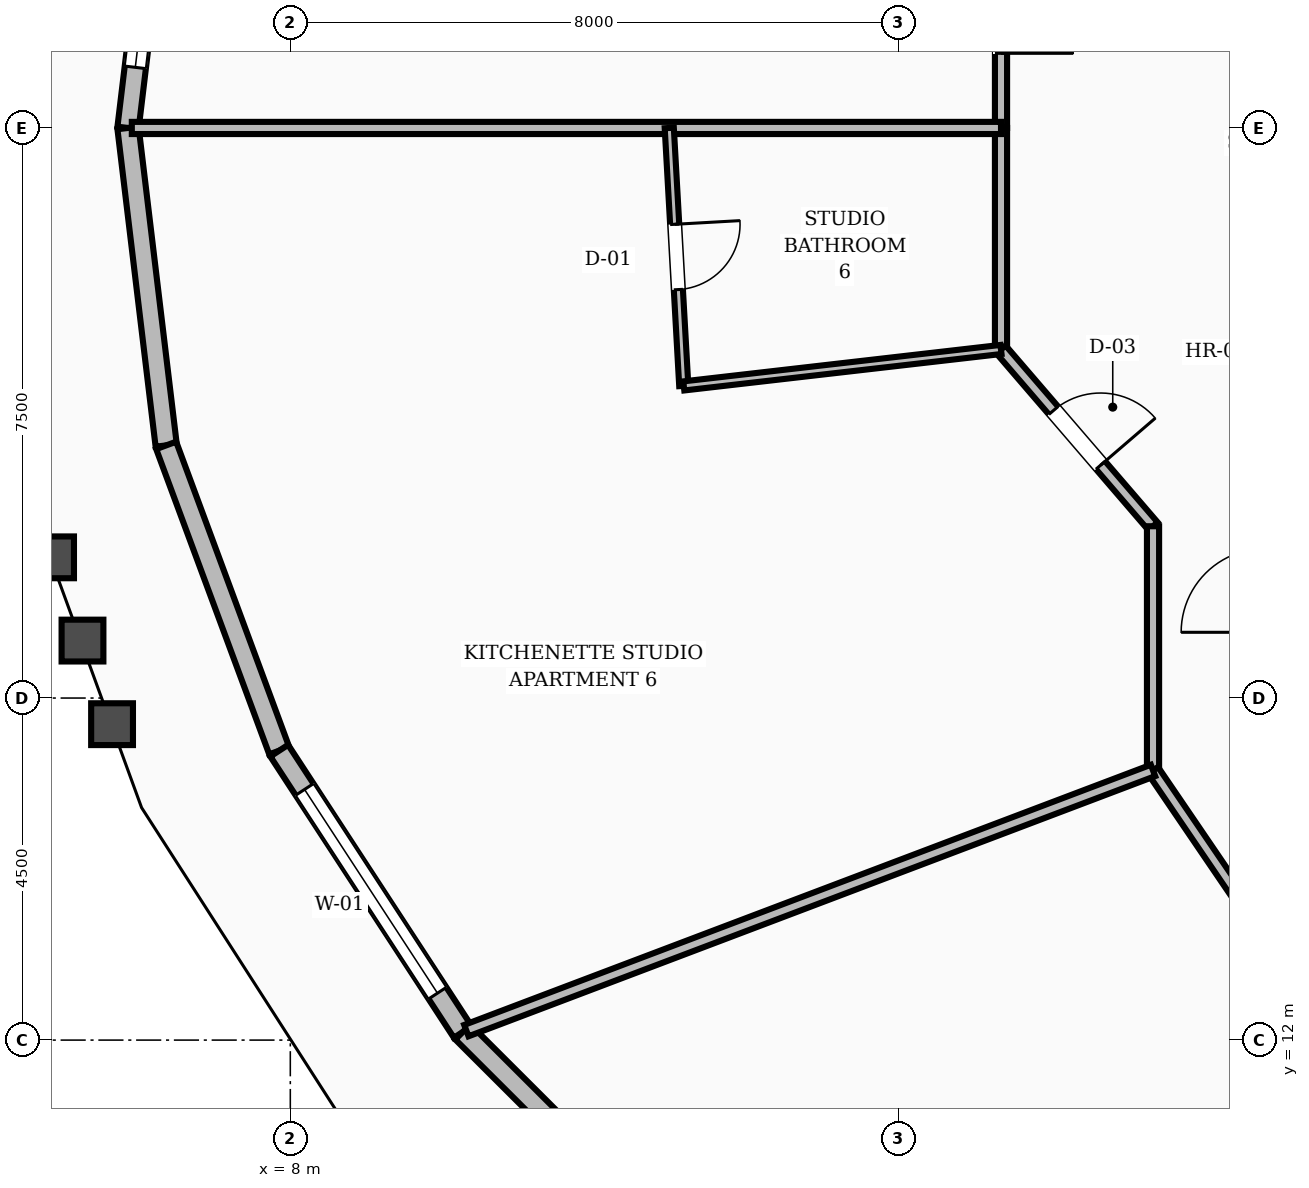
"""IFC4 building model, lengths in metres.
Left out: names, types, materials, properties, quantities, classifications, styles, units other than length and angle.
Written with IfcOpenShell. Run it as: python <this file> out.ifc"""

import sys

from ifc_helpers import new_model, si_unit, direction, frame, frame_2d, origin, place, context, subcontext, project, spatial, rectangle, extrude, element, fill, save


model = new_model("IFC4")
c1 = context("Model", 3, precision=1e-05, world=origin(), true_north=direction((0.0, 1.0)))
c2 = subcontext(c1, "Body", "Model", "MODEL_VIEW")
j1 = project(units=[si_unit("LENGTHUNIT", "METRE"), si_unit("PLANEANGLEUNIT", "RADIAN")], contexts=[c1])
p1 = place(None, origin())
s1 = spatial("IfcSite", under=j1, at=p1, CompositionType="ELEMENT")
p2 = place(p1, origin())
s2 = spatial("IfcBuilding", under=s1, at=p2, CompositionType="ELEMENT")
p3 = place(p2, frame((0.0, 0.0, 167.6)))
s3 = spatial("IfcBuildingStorey", under=s2, at=p3, CompositionType="ELEMENT", Elevation=167.6)
p4 = place(p3, frame((6.367, 28.176, 0.0), z_axis=(0.0, 0.0, 1.0), x_axis=(-0.119390105597, -0.992847421654, 0.0)))
e1 = element("IfcWall", 1, at=p4, inside=s3, PredefinedType="STANDARD", context=c2, shape_type="SweptSolid", body=[
    extrude(rectangle(XDim=4.206, YDim=0.28, at=frame_2d((2.103, 0.0))), origin(), (0.0, 0.0, 1.0), 2.82),
])
p5 = place(p4, frame((0.803, 0.0, 0.8)))
e2 = element("IfcOpeningElement", 2, at=p5, cuts=e1, PredefinedType="OPENING", context=c2, shape_type="SweptSolid", body=[
    extrude(rectangle(XDim=2.6, YDim=1.65, at=frame_2d((1.3, 0.825))), frame((0.0, 0.15, 0.0), z_axis=(0.0, -1.0, 0.0), x_axis=(1.0, 0.0, 0.0)), (0.0, 0.0, 1.0), 0.3),
])
p6 = place(p3, frame((5.865, 24.0, 0.0), z_axis=(0.0, 0.0, 1.0), x_axis=(0.119390105597, -0.992847421654, 0.0)))
e3 = element("IfcWall", 3, at=p6, inside=s3, PredefinedType="STANDARD", context=c2, shape_type="SweptSolid", body=[
    extrude(rectangle(XDim=4.206, YDim=0.28, at=frame_2d((2.103, 0.0))), origin(), (0.0, 0.0, 1.0), 2.82),
])
p7 = place(p3, frame((6.367, 19.824, 0.0), z_axis=(0.0, 0.0, 1.0), x_axis=(0.34732178329, -0.937746009777, 0.0)))
e4 = element("IfcWall", 4, at=p7, inside=s3, PredefinedType="STANDARD", context=c2, shape_type="SweptSolid", body=[
    extrude(rectangle(XDim=4.282, YDim=0.28, at=frame_2d((2.141, 0.0))), origin(), (0.0, 0.0, 1.0), 2.82),
])
p8 = place(p3, frame((7.854, 15.808, 0.0), z_axis=(0.0, 0.0, 1.0), x_axis=(0.546488523779, -0.837466592395, 0.0)))
e5 = element("IfcWall", 5, at=p8, inside=s3, PredefinedType="STANDARD", context=c2, shape_type="SweptSolid", body=[
    extrude(rectangle(XDim=4.419, YDim=0.28, at=frame_2d((2.209, 0.0))), origin(), (0.0, 0.0, 1.0), 2.82),
])
p9 = place(p8, frame((0.61, 0.0, 0.8)))
e6 = element("IfcOpeningElement", 6, at=p9, cuts=e5, PredefinedType="OPENING", context=c2, shape_type="SweptSolid", body=[
    extrude(rectangle(XDim=3.2, YDim=1.65, at=frame_2d((1.6, 0.825))), frame((0.0, 0.15, 0.0), z_axis=(0.0, -1.0, 0.0), x_axis=(1.0, 0.0, 0.0)), (0.0, 0.0, 1.0), 0.3),
])
p10 = place(p3, frame((10.269, 12.107, 0.0), z_axis=(0.0, 0.0, 1.0), x_axis=(0.707797600077, -0.706415286729, 0.0)))
e7 = element("IfcWall", 7, at=p10, inside=s3, PredefinedType="STANDARD", context=c2, shape_type="SweptSolid", body=[
    extrude(rectangle(XDim=4.592, YDim=0.28, at=frame_2d((2.296, 0.0))), origin(), (0.0, 0.0, 1.0), 2.82),
])
p11 = place(p3, frame((17.35, 26.914, 0.0), z_axis=(0.0, 0.0, 1.0), x_axis=(0.0, -1.0, 0.0)))
e8 = element("IfcWall", 8, at=p11, inside=s3, PredefinedType="SOLIDWALL", context=c2, shape_type="SweptSolid", body=[
    extrude(rectangle(XDim=2.914, YDim=0.16, at=frame_2d((1.457, 0.0))), origin(), (0.0, 0.0, 1.0), 2.8),
])
p12 = place(p11, frame((0.982, 0.0, 0.0)))
e9 = element("IfcOpeningElement", 9, at=p12, cuts=e8, PredefinedType="OPENING", context=c2, shape_type="SweptSolid", body=[
    extrude(rectangle(XDim=0.95, YDim=2.1, at=frame_2d((0.475, 1.05))), frame((0.0, 0.09, 0.0), z_axis=(0.0, -1.0, 0.0), x_axis=(1.0, 0.0, 0.0)), (0.0, 0.0, 1.0), 0.18),
])
p13 = place(p3, frame((17.35, 24.0, 0.0), z_axis=(0.0, 0.0, 1.0), x_axis=(0.0, -1.0, 0.0)))
e10 = element("IfcWall", 10, at=p13, inside=s3, PredefinedType="SOLIDWALL", context=c2, shape_type="SweptSolid", body=[
    extrude(rectangle(XDim=2.914, YDim=0.16, at=frame_2d((1.457, 0.0))), origin(), (0.0, 0.0, 1.0), 2.8),
])
p14 = place(p3, frame((17.35, 21.086, 0.0), z_axis=(0.0, 0.0, 1.0), x_axis=(0.652022797448, -0.758199361388, 0.0)))
e11 = element("IfcWall", 11, at=p14, inside=s3, PredefinedType="SOLIDWALL", context=c2, shape_type="SweptSolid", body=[
    extrude(rectangle(XDim=3.067, YDim=0.16, at=frame_2d((1.534, 0.0))), origin(), (0.0, 0.0, 1.0), 2.8),
])
p15 = place(p14, frame((1.059, 0.0, 0.0)))
e12 = element("IfcOpeningElement", 12, at=p15, cuts=e11, PredefinedType="OPENING", context=c2, shape_type="SweptSolid", body=[
    extrude(rectangle(XDim=0.95, YDim=2.1, at=frame_2d((0.475, 1.05))), frame((0.0, 0.09, 0.0), z_axis=(0.0, -1.0, 0.0), x_axis=(1.0, 0.0, 0.0)), (0.0, 0.0, 1.0), 0.18),
])
p16 = place(p3, frame((19.35, 18.76, 0.0), z_axis=(0.0, 0.0, 1.0), x_axis=(0.0, -1.0, 0.0)))
e13 = element("IfcWall", 13, at=p16, inside=s3, PredefinedType="SOLIDWALL", context=c2, shape_type="SweptSolid", body=[
    extrude(rectangle(XDim=3.213, YDim=0.16, at=frame_2d((1.606, 0.0))), origin(), (0.0, 0.0, 1.0), 2.8),
])
p17 = place(p3, frame((19.35, 15.548, 0.0), z_axis=(0.0, 0.0, 1.0), x_axis=(0.562674669208, -0.826678423955, 0.0)))
e14 = element("IfcWall", 14, at=p17, inside=s3, PredefinedType="SOLIDWALL", context=c2, shape_type="SweptSolid", body=[
    extrude(rectangle(XDim=3.021, YDim=0.16, at=frame_2d((1.511, 0.0))), origin(), (0.0, 0.0, 1.0), 2.8),
])
p18 = place(p3, frame((17.35, 24.0, 0.0), z_axis=(0.0, 0.0, 1.0), x_axis=(-1.0, 0.0, 0.0)))
e15 = element("IfcWall", 15, at=p18, inside=s3, PredefinedType="SOLIDWALL", context=c2, shape_type="SweptSolid", body=[
    extrude(rectangle(XDim=11.435, YDim=0.16, at=frame_2d((5.718, 0.0))), origin(), (0.0, 0.0, 1.0), 2.8),
])
p19 = place(p3, frame((12.986, 24.0, 0.0), z_axis=(0.0, 0.0, 1.0), x_axis=(0.056166143668, -0.998421436221, 0.0)))
e16 = element("IfcWall", 16, at=p19, inside=s3, PredefinedType="PARTITIONING", context=c2, shape_type="SweptSolid", body=[
    extrude(rectangle(XDim=3.399, YDim=0.12, at=frame_2d((1.7, 0.0))), origin(), (0.0, 0.0, 1.0), 2.8),
])
p20 = place(p19, frame((1.27, 0.0, 0.0)))
e17 = element("IfcOpeningElement", 17, at=p20, cuts=e16, PredefinedType="OPENING", context=c2, shape_type="SweptSolid", body=[
    extrude(rectangle(XDim=0.86, YDim=2.1, at=frame_2d((0.43, 1.05))), frame((0.0, 0.07, 0.0), z_axis=(0.0, -1.0, 0.0), x_axis=(1.0, 0.0, 0.0)), (0.0, 0.0, 1.0), 0.14),
])
p21 = place(p3, frame((17.35, 21.086, 0.0), z_axis=(0.0, 0.0, 1.0), x_axis=(-0.993458472939, -0.114193968957, 0.0)))
e18 = element("IfcWall", 18, at=p21, inside=s3, PredefinedType="PARTITIONING", context=c2, shape_type="SweptSolid", body=[
    extrude(rectangle(XDim=4.201, YDim=0.12, at=frame_2d((2.101, 0.0))), origin(), (0.0, 0.0, 1.0), 2.8),
])
p22 = place(p3, frame((19.35, 15.548, 0.0), z_axis=(0.0, 0.0, 1.0), x_axis=(-0.935128365782, -0.354309101647, 0.0)))
e19 = element("IfcWall", 19, at=p22, inside=s3, PredefinedType="SOLIDWALL", context=c2, shape_type="SweptSolid", body=[
    extrude(rectangle(XDim=9.661, YDim=0.16, at=frame_2d((4.83, 0.0))), origin(), (0.0, 0.0, 1.0), 2.8),
])
p23 = place(p5, origin())
e20 = element("IfcWindow", 20, at=p23, inside=s3, PartitioningType="SINGLE_PANEL", PredefinedType="WINDOW", context=c2, shape_type="SweptSolid", body=[
    extrude(rectangle(XDim=2.6, YDim=1.65, at=frame_2d((1.3, 0.825))), frame((0.0, 0.03, 0.0), z_axis=(0.0, -1.0, 0.0), x_axis=(1.0, 0.0, 0.0)), (0.0, 0.0, 1.0), 0.06),
])
fill(e2, e20)
p24 = place(p9, origin())
e21 = element("IfcWindow", 21, at=p24, inside=s3, PartitioningType="SINGLE_PANEL", PredefinedType="WINDOW", context=c2, shape_type="SweptSolid", body=[
    extrude(rectangle(XDim=3.2, YDim=1.65, at=frame_2d((1.6, 0.825))), frame((0.0, 0.03, 0.0), z_axis=(0.0, -1.0, 0.0), x_axis=(1.0, 0.0, 0.0)), (0.0, 0.0, 1.0), 0.06),
])
fill(e6, e21)
p25 = place(p12, origin())
e22 = element("IfcDoor", 22, at=p25, inside=s3, OperationType="SINGLE_SWING_RIGHT", PredefinedType="DOOR", context=c2, shape_type="SweptSolid", body=[
    extrude(rectangle(XDim=0.95, YDim=2.1, at=frame_2d((0.475, 1.05))), frame((0.0, 0.025, 0.0), z_axis=(0.0, -1.0, 0.0), x_axis=(1.0, 0.0, 0.0)), (0.0, 0.0, 1.0), 0.05),
])
fill(e9, e22)
p26 = place(p20, origin())
e23 = element("IfcDoor", 23, at=p26, inside=s3, OperationType="SINGLE_SWING_LEFT", PredefinedType="DOOR", context=c2, shape_type="SweptSolid", body=[
    extrude(rectangle(XDim=0.86, YDim=2.1, at=frame_2d((0.43, 1.05))), frame((0.0, 0.025, 0.0), z_axis=(0.0, -1.0, 0.0), x_axis=(1.0, 0.0, 0.0)), (0.0, 0.0, 1.0), 0.05),
])
fill(e17, e23)
p27 = place(p15, origin())
e24 = element("IfcDoor", 24, at=p27, inside=s3, OperationType="SINGLE_SWING_RIGHT", PredefinedType="DOOR", context=c2, shape_type="SweptSolid", body=[
    extrude(rectangle(XDim=0.95, YDim=2.1, at=frame_2d((0.475, 1.05))), frame((0.0, 0.025, 0.0), z_axis=(0.0, -1.0, 0.0), x_axis=(1.0, 0.0, 0.0)), (0.0, 0.0, 1.0), 0.05),
])
fill(e12, e24)
save(model, sys.argv[1])
